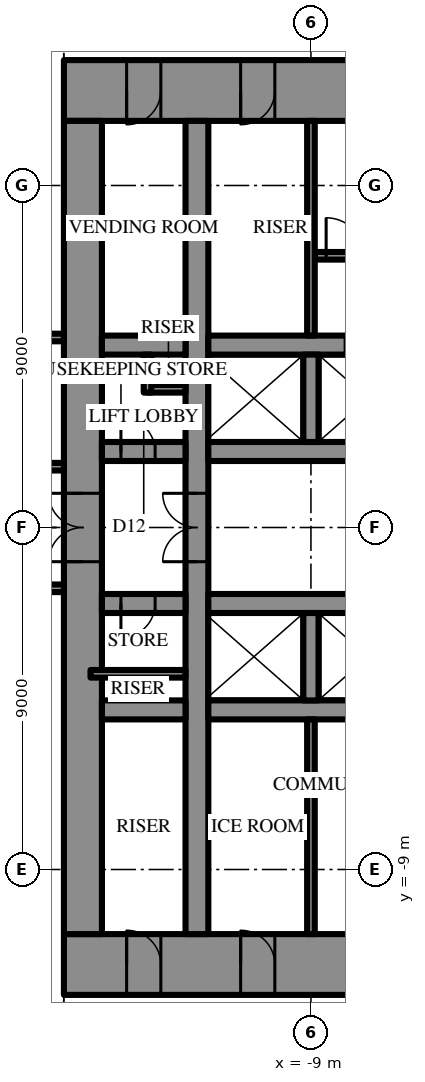
"""IFC4 building model, lengths in metres.
Left out: names, types, materials, properties, quantities, classifications, styles, units other than length and angle.
Written with IfcOpenShell. Run it as: python <this file> out.ifc"""

import sys

from ifc_helpers import new_model, si_unit, direction, frame, frame_2d, origin, place, context, subcontext, project, spatial, rectangle, extrude, element, fill, save


model = new_model("IFC4")
c1 = context("Model", 3, precision=1e-05, world=origin(), true_north=direction((0.0, 1.0)))
c2 = subcontext(c1, "Body", "Model", "MODEL_VIEW")
j1 = project(units=[si_unit("LENGTHUNIT", "METRE"), si_unit("PLANEANGLEUNIT", "RADIAN")], contexts=[c1])
p1 = place(None, origin())
s1 = spatial("IfcSite", under=j1, at=p1, CompositionType="ELEMENT")
p2 = place(p1, origin())
s2 = spatial("IfcBuilding", under=s1, at=p2, CompositionType="ELEMENT")
p3 = place(p2, frame((0.0, 0.0, 278.5)))
s3 = spatial("IfcBuildingStorey", under=s2, at=p3, CompositionType="ELEMENT", Elevation=278.5)
p4 = place(p3, frame((-15.5, 11.5, 0.0), z_axis=(0.0, 0.0, 1.0), x_axis=(1.0, 0.0, 0.0)))
e1 = element("IfcWall", 1, at=p4, inside=s3, PredefinedType="SHEAR", context=c2, shape_type="SweptSolid", body=[
    extrude(rectangle(XDim=31.0, YDim=1.6, at=frame_2d((15.5, 0.0))), origin(), (0.0, 0.0, 1.0), 4.2),
])
p5 = place(p4, frame((16.35, 0.0, 0.0)))
e2 = element("IfcOpeningElement", 2, at=p5, cuts=e1, PredefinedType="OPENING", context=c2, shape_type="SweptSolid", body=[
    extrude(rectangle(XDim=0.9, YDim=2.2, at=frame_2d((0.45, 1.1))), frame((0.0, 0.81, 0.0), z_axis=(0.0, -1.0, 0.0), x_axis=(1.0, 0.0, 0.0)), (0.0, 0.0, 1.0), 1.62),
])
p6 = place(p4, frame((19.35, 0.0, 0.0)))
e3 = element("IfcOpeningElement", 3, at=p6, cuts=e1, PredefinedType="OPENING", context=c2, shape_type="SweptSolid", body=[
    extrude(rectangle(XDim=0.9, YDim=2.2, at=frame_2d((0.45, 1.1))), frame((0.0, 0.81, 0.0), z_axis=(0.0, -1.0, 0.0), x_axis=(1.0, 0.0, 0.0)), (0.0, 0.0, 1.0), 1.62),
])
p7 = place(p4, frame((22.4, 0.0, 0.0)))
e4 = element("IfcOpeningElement", 4, at=p7, cuts=e1, PredefinedType="OPENING", context=c2, shape_type="SweptSolid", body=[
    extrude(rectangle(XDim=1.0, YDim=2.2, at=frame_2d((0.5, 1.1))), frame((0.0, 0.81, 0.0), z_axis=(0.0, -1.0, 0.0), x_axis=(1.0, 0.0, 0.0)), (0.0, 0.0, 1.0), 1.62),
])
p8 = place(p4, frame((1.65, 0.0, 0.0)))
e5 = element("IfcOpeningElement", 5, at=p8, cuts=e1, PredefinedType="OPENING", context=c2, shape_type="SweptSolid", body=[
    extrude(rectangle(XDim=0.9, YDim=2.2, at=frame_2d((0.45, 1.1))), frame((0.0, 0.81, 0.0), z_axis=(0.0, -1.0, 0.0), x_axis=(1.0, 0.0, 0.0)), (0.0, 0.0, 1.0), 1.62),
])
p9 = place(p4, frame((4.65, 0.0, 0.0)))
e6 = element("IfcOpeningElement", 6, at=p9, cuts=e1, PredefinedType="OPENING", context=c2, shape_type="SweptSolid", body=[
    extrude(rectangle(XDim=0.9, YDim=2.2, at=frame_2d((0.45, 1.1))), frame((0.0, 0.81, 0.0), z_axis=(0.0, -1.0, 0.0), x_axis=(1.0, 0.0, 0.0)), (0.0, 0.0, 1.0), 1.62),
])
p10 = place(p4, frame((25.45, 0.0, 0.0)))
e7 = element("IfcOpeningElement", 7, at=p10, cuts=e1, PredefinedType="OPENING", context=c2, shape_type="SweptSolid", body=[
    extrude(rectangle(XDim=0.9, YDim=2.2, at=frame_2d((0.45, 1.1))), frame((0.0, 0.81, 0.0), z_axis=(0.0, -1.0, 0.0), x_axis=(1.0, 0.0, 0.0)), (0.0, 0.0, 1.0), 1.62),
])
p11 = place(p4, frame((28.45, 0.0, 0.0)))
e8 = element("IfcOpeningElement", 8, at=p11, cuts=e1, PredefinedType="OPENING", context=c2, shape_type="SweptSolid", body=[
    extrude(rectangle(XDim=0.9, YDim=2.2, at=frame_2d((0.45, 1.1))), frame((0.0, 0.81, 0.0), z_axis=(0.0, -1.0, 0.0), x_axis=(1.0, 0.0, 0.0)), (0.0, 0.0, 1.0), 1.62),
])
p12 = place(p3, frame((15.5, -11.5, 0.0), z_axis=(0.0, 0.0, 1.0), x_axis=(-1.0, 0.0, 0.0)))
e9 = element("IfcWall", 9, at=p12, inside=s3, PredefinedType="SHEAR", context=c2, shape_type="SweptSolid", body=[
    extrude(rectangle(XDim=31.0, YDim=1.6, at=frame_2d((15.5, 0.0))), origin(), (0.0, 0.0, 1.0), 4.2),
])
p13 = place(p12, frame((16.35, 0.0, 0.0)))
e10 = element("IfcOpeningElement", 10, at=p13, cuts=e9, PredefinedType="OPENING", context=c2, shape_type="SweptSolid", body=[
    extrude(rectangle(XDim=0.9, YDim=2.2, at=frame_2d((0.45, 1.1))), frame((0.0, 0.81, 0.0), z_axis=(0.0, -1.0, 0.0), x_axis=(1.0, 0.0, 0.0)), (0.0, 0.0, 1.0), 1.62),
])
p14 = place(p12, frame((19.35, 0.0, 0.0)))
e11 = element("IfcOpeningElement", 11, at=p14, cuts=e9, PredefinedType="OPENING", context=c2, shape_type="SweptSolid", body=[
    extrude(rectangle(XDim=0.9, YDim=2.2, at=frame_2d((0.45, 1.1))), frame((0.0, 0.81, 0.0), z_axis=(0.0, -1.0, 0.0), x_axis=(1.0, 0.0, 0.0)), (0.0, 0.0, 1.0), 1.62),
])
p15 = place(p12, frame((22.4, 0.0, 0.0)))
e12 = element("IfcOpeningElement", 12, at=p15, cuts=e9, PredefinedType="OPENING", context=c2, shape_type="SweptSolid", body=[
    extrude(rectangle(XDim=1.0, YDim=2.2, at=frame_2d((0.5, 1.1))), frame((0.0, 0.81, 0.0), z_axis=(0.0, -1.0, 0.0), x_axis=(1.0, 0.0, 0.0)), (0.0, 0.0, 1.0), 1.62),
])
p16 = place(p12, frame((1.65, 0.0, 0.0)))
e13 = element("IfcOpeningElement", 13, at=p16, cuts=e9, PredefinedType="OPENING", context=c2, shape_type="SweptSolid", body=[
    extrude(rectangle(XDim=0.9, YDim=2.2, at=frame_2d((0.45, 1.1))), frame((0.0, 0.81, 0.0), z_axis=(0.0, -1.0, 0.0), x_axis=(1.0, 0.0, 0.0)), (0.0, 0.0, 1.0), 1.62),
])
p17 = place(p12, frame((4.65, 0.0, 0.0)))
e14 = element("IfcOpeningElement", 14, at=p17, cuts=e9, PredefinedType="OPENING", context=c2, shape_type="SweptSolid", body=[
    extrude(rectangle(XDim=0.9, YDim=2.2, at=frame_2d((0.45, 1.1))), frame((0.0, 0.81, 0.0), z_axis=(0.0, -1.0, 0.0), x_axis=(1.0, 0.0, 0.0)), (0.0, 0.0, 1.0), 1.62),
])
p18 = place(p12, frame((25.45, 0.0, 0.0)))
e15 = element("IfcOpeningElement", 15, at=p18, cuts=e9, PredefinedType="OPENING", context=c2, shape_type="SweptSolid", body=[
    extrude(rectangle(XDim=0.9, YDim=2.2, at=frame_2d((0.45, 1.1))), frame((0.0, 0.81, 0.0), z_axis=(0.0, -1.0, 0.0), x_axis=(1.0, 0.0, 0.0)), (0.0, 0.0, 1.0), 1.62),
])
p19 = place(p12, frame((28.45, 0.0, 0.0)))
e16 = element("IfcOpeningElement", 16, at=p19, cuts=e9, PredefinedType="OPENING", context=c2, shape_type="SweptSolid", body=[
    extrude(rectangle(XDim=0.9, YDim=2.2, at=frame_2d((0.45, 1.1))), frame((0.0, 0.81, 0.0), z_axis=(0.0, -1.0, 0.0), x_axis=(1.0, 0.0, 0.0)), (0.0, 0.0, 1.0), 1.62),
])
p20 = place(p3, frame((-15.0, 10.7, 0.0), z_axis=(0.0, 0.0, 1.0), x_axis=(0.0, -1.0, 0.0)))
e17 = element("IfcWall", 17, at=p20, inside=s3, PredefinedType="SHEAR", context=c2, shape_type="SweptSolid", body=[
    extrude(rectangle(XDim=21.4, YDim=1.0, at=frame_2d((10.7, 0.0))), origin(), (0.0, 0.0, 1.0), 4.2),
])
p21 = place(p20, frame((9.8, 0.0, 0.0)))
e18 = element("IfcOpeningElement", 18, at=p21, cuts=e17, PredefinedType="OPENING", context=c2, shape_type="SweptSolid", body=[
    extrude(rectangle(XDim=1.8, YDim=2.4, at=frame_2d((0.9, 1.2))), frame((0.0, 0.51, 0.0), z_axis=(0.0, -1.0, 0.0), x_axis=(1.0, 0.0, 0.0)), (0.0, 0.0, 1.0), 1.02),
])
p22 = place(p3, frame((-12.0, -10.7, 0.0), z_axis=(0.0, 0.0, 1.0), x_axis=(0.0, 1.0, 0.0)))
e19 = element("IfcWall", 19, at=p22, inside=s3, PredefinedType="SHEAR", context=c2, shape_type="SweptSolid", body=[
    extrude(rectangle(XDim=21.4, YDim=0.6, at=frame_2d((10.7, 0.0))), origin(), (0.0, 0.0, 1.0), 4.2),
])
p23 = place(p22, frame((9.8, 0.0, 0.0)))
e20 = element("IfcOpeningElement", 20, at=p23, cuts=e19, PredefinedType="OPENING", context=c2, shape_type="SweptSolid", body=[
    extrude(rectangle(XDim=1.8, YDim=2.4, at=frame_2d((0.9, 1.2))), frame((0.0, 0.31, 0.0), z_axis=(0.0, -1.0, 0.0), x_axis=(1.0, 0.0, 0.0)), (0.0, 0.0, 1.0), 0.62),
])
p24 = place(p3, frame((-14.5, 2.0, 0.0), z_axis=(0.0, 0.0, 1.0), x_axis=(1.0, 0.0, 0.0)))
e21 = element("IfcWall", 21, at=p24, inside=s3, PredefinedType="SHEAR", context=c2, shape_type="SweptSolid", body=[
    extrude(rectangle(XDim=2.2, YDim=0.5, at=frame_2d((1.1, 0.0))), origin(), (0.0, 0.0, 1.0), 4.2),
])
p25 = place(p24, frame((0.5, 0.0, 0.0)))
e22 = element("IfcOpeningElement", 22, at=p25, cuts=e21, PredefinedType="OPENING", context=c2, shape_type="SweptSolid", body=[
    extrude(rectangle(XDim=0.9, YDim=2.2, at=frame_2d((0.45, 1.1))), frame((0.0, 0.26, 0.0), z_axis=(0.0, -1.0, 0.0), x_axis=(1.0, 0.0, 0.0)), (0.0, 0.0, 1.0), 0.52),
])
p26 = place(p3, frame((-11.7, 2.0, 0.0), z_axis=(0.0, 0.0, 1.0), x_axis=(1.0, 0.0, 0.0)))
e23 = element("IfcWall", 23, at=p26, inside=s3, PredefinedType="SHEAR", context=c2, shape_type="SweptSolid", body=[
    extrude(rectangle(XDim=5.9, YDim=0.5, at=frame_2d((2.95, 0.0))), origin(), (0.0, 0.0, 1.0), 4.2),
])
p27 = place(p3, frame((-14.5, 4.8, 0.0), z_axis=(0.0, 0.0, 1.0), x_axis=(1.0, 0.0, 0.0)))
e24 = element("IfcWall", 24, at=p27, inside=s3, PredefinedType="SHEAR", context=c2, shape_type="SweptSolid", body=[
    extrude(rectangle(XDim=2.2, YDim=0.5, at=frame_2d((1.1, 0.0))), origin(), (0.0, 0.0, 1.0), 4.2),
])
p28 = place(p3, frame((-11.7, 4.8, 0.0), z_axis=(0.0, 0.0, 1.0), x_axis=(1.0, 0.0, 0.0)))
e25 = element("IfcWall", 25, at=p28, inside=s3, PredefinedType="SHEAR", context=c2, shape_type="SweptSolid", body=[
    extrude(rectangle(XDim=23.4, YDim=0.5, at=frame_2d((11.7, 0.0))), origin(), (0.0, 0.0, 1.0), 4.2),
])
p29 = place(p28, frame((6.6, 0.0, 0.0)))
e26 = element("IfcOpeningElement", 26, at=p29, cuts=e25, PredefinedType="OPENING", context=c2, shape_type="SweptSolid", body=[
    extrude(rectangle(XDim=1.2, YDim=2.2, at=frame_2d((0.6, 1.1))), frame((0.0, 0.26, 0.0), z_axis=(0.0, -1.0, 0.0), x_axis=(1.0, 0.0, 0.0)), (0.0, 0.0, 1.0), 0.52),
])
p30 = place(p28, frame((3.6, 0.0, 0.0)))
e27 = element("IfcOpeningElement", 27, at=p30, cuts=e25, PredefinedType="OPENING", context=c2, shape_type="SweptSolid", body=[
    extrude(rectangle(XDim=1.2, YDim=2.2, at=frame_2d((0.6, 1.1))), frame((0.0, 0.26, 0.0), z_axis=(0.0, -1.0, 0.0), x_axis=(1.0, 0.0, 0.0)), (0.0, 0.0, 1.0), 0.52),
])
p31 = place(p3, frame((-9.0, 2.25, 0.0), z_axis=(0.0, 0.0, 1.0), x_axis=(0.0, 1.0, 0.0)))
e28 = element("IfcWall", 28, at=p31, inside=s3, PredefinedType="SHEAR", context=c2, shape_type="SweptSolid", body=[
    extrude(rectangle(XDim=2.3, YDim=0.4, at=frame_2d((1.15, 0.0))), origin(), (0.0, 0.0, 1.0), 4.2),
])
p32 = place(p3, frame((-8.9, 7.15, 0.0), z_axis=(0.0, 0.0, 1.0), x_axis=(1.0, 0.0, 0.0)))
e29 = element("IfcWall", 29, at=p32, inside=s3, PredefinedType="SHEAR", context=c2, shape_type="SweptSolid", body=[
    extrude(rectangle(XDim=8.6, YDim=0.2, at=frame_2d((4.3, 0.0))), origin(), (0.0, 0.0, 1.0), 4.2),
])
p33 = place(p32, frame((0.3, 0.0, 0.0)))
e30 = element("IfcOpeningElement", 30, at=p33, cuts=e29, PredefinedType="OPENING", context=c2, shape_type="SweptSolid", body=[
    extrude(rectangle(XDim=1.0, YDim=2.2, at=frame_2d((0.5, 1.1))), frame((0.0, 0.11, 0.0), z_axis=(0.0, -1.0, 0.0), x_axis=(1.0, 0.0, 0.0)), (0.0, 0.0, 1.0), 0.22),
])
p34 = place(p3, frame((3.2, -2.0, 0.0), z_axis=(0.0, 0.0, 1.0), x_axis=(-1.0, 0.0, 0.0)))
e31 = element("IfcWall", 31, at=p34, inside=s3, PredefinedType="SHEAR", context=c2, shape_type="SweptSolid", body=[
    extrude(rectangle(XDim=14.9, YDim=0.5, at=frame_2d((7.45, 0.0))), origin(), (0.0, 0.0, 1.0), 4.2),
])
p35 = place(p34, frame((1.15, 0.0, 0.0)))
e32 = element("IfcOpeningElement", 32, at=p35, cuts=e31, PredefinedType="OPENING", context=c2, shape_type="SweptSolid", body=[
    extrude(rectangle(XDim=1.1, YDim=2.2, at=frame_2d((0.55, 1.1))), frame((0.0, 0.26, 0.0), z_axis=(0.0, -1.0, 0.0), x_axis=(1.0, 0.0, 0.0)), (0.0, 0.0, 1.0), 0.52),
])
p36 = place(p34, frame((4.15, 0.0, 0.0)))
e33 = element("IfcOpeningElement", 33, at=p36, cuts=e31, PredefinedType="OPENING", context=c2, shape_type="SweptSolid", body=[
    extrude(rectangle(XDim=1.1, YDim=2.2, at=frame_2d((0.55, 1.1))), frame((0.0, 0.26, 0.0), z_axis=(0.0, -1.0, 0.0), x_axis=(1.0, 0.0, 0.0)), (0.0, 0.0, 1.0), 0.52),
])
p37 = place(p34, frame((7.15, 0.0, 0.0)))
e34 = element("IfcOpeningElement", 34, at=p37, cuts=e31, PredefinedType="OPENING", context=c2, shape_type="SweptSolid", body=[
    extrude(rectangle(XDim=1.1, YDim=2.2, at=frame_2d((0.55, 1.1))), frame((0.0, 0.26, 0.0), z_axis=(0.0, -1.0, 0.0), x_axis=(1.0, 0.0, 0.0)), (0.0, 0.0, 1.0), 0.52),
])
p38 = place(p34, frame((10.15, 0.0, 0.0)))
e35 = element("IfcOpeningElement", 35, at=p38, cuts=e31, PredefinedType="OPENING", context=c2, shape_type="SweptSolid", body=[
    extrude(rectangle(XDim=1.1, YDim=2.2, at=frame_2d((0.55, 1.1))), frame((0.0, 0.26, 0.0), z_axis=(0.0, -1.0, 0.0), x_axis=(1.0, 0.0, 0.0)), (0.0, 0.0, 1.0), 0.52),
])
p39 = place(p3, frame((-12.3, -2.0, 0.0), z_axis=(0.0, 0.0, 1.0), x_axis=(-1.0, 0.0, 0.0)))
e36 = element("IfcWall", 36, at=p39, inside=s3, PredefinedType="SHEAR", context=c2, shape_type="SweptSolid", body=[
    extrude(rectangle(XDim=2.2, YDim=0.5, at=frame_2d((1.1, 0.0))), origin(), (0.0, 0.0, 1.0), 4.2),
])
p40 = place(p39, frame((0.8, 0.0, 0.0)))
e37 = element("IfcOpeningElement", 37, at=p40, cuts=e36, PredefinedType="OPENING", context=c2, shape_type="SweptSolid", body=[
    extrude(rectangle(XDim=0.9, YDim=2.2, at=frame_2d((0.45, 1.1))), frame((0.0, 0.26, 0.0), z_axis=(0.0, -1.0, 0.0), x_axis=(1.0, 0.0, 0.0)), (0.0, 0.0, 1.0), 0.52),
])
p41 = place(p3, frame((11.7, -4.8, 0.0), z_axis=(0.0, 0.0, 1.0), x_axis=(-1.0, 0.0, 0.0)))
e38 = element("IfcWall", 38, at=p41, inside=s3, PredefinedType="SHEAR", context=c2, shape_type="SweptSolid", body=[
    extrude(rectangle(XDim=23.4, YDim=0.5, at=frame_2d((11.7, 0.0))), origin(), (0.0, 0.0, 1.0), 4.2),
])
p42 = place(p41, frame((6.6, 0.0, 0.0)))
e39 = element("IfcOpeningElement", 39, at=p42, cuts=e38, PredefinedType="OPENING", context=c2, shape_type="SweptSolid", body=[
    extrude(rectangle(XDim=1.2, YDim=2.2, at=frame_2d((0.6, 1.1))), frame((0.0, 0.26, 0.0), z_axis=(0.0, -1.0, 0.0), x_axis=(1.0, 0.0, 0.0)), (0.0, 0.0, 1.0), 0.52),
])
p43 = place(p41, frame((3.6, 0.0, 0.0)))
e40 = element("IfcOpeningElement", 40, at=p43, cuts=e38, PredefinedType="OPENING", context=c2, shape_type="SweptSolid", body=[
    extrude(rectangle(XDim=1.2, YDim=2.2, at=frame_2d((0.6, 1.1))), frame((0.0, 0.26, 0.0), z_axis=(0.0, -1.0, 0.0), x_axis=(1.0, 0.0, 0.0)), (0.0, 0.0, 1.0), 0.52),
])
p44 = place(p3, frame((-12.3, -4.8, 0.0), z_axis=(0.0, 0.0, 1.0), x_axis=(-1.0, 0.0, 0.0)))
e41 = element("IfcWall", 41, at=p44, inside=s3, PredefinedType="SHEAR", context=c2, shape_type="SweptSolid", body=[
    extrude(rectangle(XDim=2.2, YDim=0.5, at=frame_2d((1.1, 0.0))), origin(), (0.0, 0.0, 1.0), 4.2),
])
p45 = place(p3, frame((-9.0, -2.25, 0.0), z_axis=(0.0, 0.0, 1.0), x_axis=(0.0, -1.0, 0.0)))
e42 = element("IfcWall", 42, at=p45, inside=s3, PredefinedType="SHEAR", context=c2, shape_type="SweptSolid", body=[
    extrude(rectangle(XDim=2.3, YDim=0.4, at=frame_2d((1.15, 0.0))), origin(), (0.0, 0.0, 1.0), 4.2),
])
for number, where, z_axis, x_axis in (
    (43, (-9.0, 5.05, 0.0), (0.0, 0.0, 1.0), (0.0, 1.0, 0.0)),
    (44, (-9.0, -5.05, 0.0), (0.0, 0.0, 1.0), (0.0, -1.0, 0.0)),
):
    element("IfcWall", number, at=place(p3, frame(where, z_axis=z_axis, x_axis=x_axis)), inside=s3, PredefinedType="PARTITIONING", context=c2, shape_type="SweptSolid", body=[
        extrude(rectangle(XDim=5.65, YDim=0.2, at=frame_2d((2.825, 0.0))), origin(), (0.0, 0.0, 1.0), 4.0),
    ])
for number, where, z_axis, x_axis in (
    (45, (-13.3, 3.65, 0.0), (0.0, 0.0, 1.0), (1.0, 0.0, 0.0)),
    (46, (-13.3, 3.55, 0.0), (0.0, 0.0, 1.0), (0.0, 1.0, 0.0)),
):
    element("IfcWall", number, at=place(p3, frame(where, z_axis=z_axis, x_axis=x_axis)), inside=s3, PredefinedType="PARTITIONING", context=c2, shape_type="SweptSolid", body=[
        extrude(rectangle(XDim=1.0, YDim=0.2, at=frame_2d((0.5, 0.0))), origin(), (0.0, 0.0, 1.0), 4.0),
    ])
p46 = place(p3, frame((-12.3, -3.85, 0.0), z_axis=(0.0, 0.0, 1.0), x_axis=(-1.0, 0.0, 0.0)))
e47 = element("IfcWall", 47, at=p46, inside=s3, PredefinedType="PARTITIONING", context=c2, shape_type="SweptSolid", body=[
    extrude(rectangle(XDim=2.5, YDim=0.2, at=frame_2d((1.25, 0.0))), origin(), (0.0, 0.0, 1.0), 4.0),
])
p47 = place(p3, frame((-15.5, 1.6, 0.0), z_axis=(0.0, 0.0, 1.0), x_axis=(-1.0, 0.0, 0.0)))
e48 = element("IfcWall", 48, at=p47, inside=s3, PredefinedType="PARTITIONING", context=c2, shape_type="SweptSolid", body=[
    extrude(rectangle(XDim=12.2, YDim=0.2, at=frame_2d((6.1, 0.0))), origin(), (0.0, 0.0, 1.0), 4.0),
])
p48 = place(p47, frame((8.04, 0.0, 0.0)))
e49 = element("IfcOpeningElement", 49, at=p48, cuts=e48, PredefinedType="OPENING", context=c2, shape_type="SweptSolid", body=[
    extrude(rectangle(XDim=1.0, YDim=2.2, at=frame_2d((0.5, 1.1))), frame((0.0, 0.11, 0.0), z_axis=(0.0, -1.0, 0.0), x_axis=(1.0, 0.0, 0.0)), (0.0, 0.0, 1.0), 0.22),
])
p49 = place(p3, frame((-15.5, -1.6, 0.0), z_axis=(0.0, 0.0, 1.0), x_axis=(-1.0, 0.0, 0.0)))
e50 = element("IfcWall", 50, at=p49, inside=s3, PredefinedType="PARTITIONING", context=c2, shape_type="SweptSolid", body=[
    extrude(rectangle(XDim=12.2, YDim=0.2, at=frame_2d((6.1, 0.0))), origin(), (0.0, 0.0, 1.0), 4.0),
])
p50 = place(p49, frame((8.04, 0.0, 0.0)))
e51 = element("IfcOpeningElement", 51, at=p50, cuts=e50, PredefinedType="OPENING", context=c2, shape_type="SweptSolid", body=[
    extrude(rectangle(XDim=1.0, YDim=2.2, at=frame_2d((0.5, 1.1))), frame((0.0, 0.11, 0.0), z_axis=(0.0, -1.0, 0.0), x_axis=(1.0, 0.0, 0.0)), (0.0, 0.0, 1.0), 0.22),
])
p51 = place(p3, frame((-15.5, 5.0, 0.0), z_axis=(0.0, 0.0, 1.0), x_axis=(-1.0, 0.0, 0.0)))
e52 = element("IfcWall", 52, at=p51, inside=s3, PredefinedType="PARTITIONING", context=c2, shape_type="SweptSolid", body=[
    extrude(rectangle(XDim=14.845, YDim=0.2, at=frame_2d((7.423, 0.0))), origin(), (0.0, 0.0, 1.0), 4.0),
])
p52 = place(p51, frame((0.985, 0.0, 0.0)))
e53 = element("IfcOpeningElement", 53, at=p52, cuts=e52, PredefinedType="OPENING", context=c2, shape_type="SweptSolid", body=[
    extrude(rectangle(XDim=1.0, YDim=2.2, at=frame_2d((0.5, 1.1))), frame((0.0, 0.11, 0.0), z_axis=(0.0, -1.0, 0.0), x_axis=(1.0, 0.0, 0.0)), (0.0, 0.0, 1.0), 0.22),
])
p53 = place(p21, frame((1.8, 0.0, 0.0), z_axis=(0.0, 0.0, 1.0), x_axis=(-1.0, 0.0, 0.0)))
e54 = element("IfcDoor", 54, at=p53, inside=s3, OperationType="DOUBLE_DOOR_SINGLE_SWING", PredefinedType="DOOR", context=c2, shape_type="SweptSolid", body=[
    extrude(rectangle(XDim=1.8, YDim=2.4, at=frame_2d((0.9, 1.2))), frame((0.0, 0.025, 0.0), z_axis=(0.0, -1.0, 0.0), x_axis=(1.0, 0.0, 0.0)), (0.0, 0.0, 1.0), 0.05),
])
fill(e18, e54)
p54 = place(p33, origin())
e55 = element("IfcDoor", 55, at=p54, inside=s3, OperationType="SINGLE_SWING_RIGHT", PredefinedType="DOOR", context=c2, shape_type="SweptSolid", body=[
    extrude(rectangle(XDim=1.0, YDim=2.2, at=frame_2d((0.5, 1.1))), frame((0.0, 0.025, 0.0), z_axis=(0.0, -1.0, 0.0), x_axis=(1.0, 0.0, 0.0)), (0.0, 0.0, 1.0), 0.05),
])
fill(e30, e55)
p55 = place(p8, frame((0.9, 0.0, 0.0), z_axis=(0.0, 0.0, 1.0), x_axis=(-1.0, 0.0, 0.0)))
e56 = element("IfcDoor", 56, at=p55, inside=s3, OperationType="SINGLE_SWING_LEFT", PredefinedType="DOOR", context=c2, shape_type="SweptSolid", body=[
    extrude(rectangle(XDim=0.9, YDim=2.2, at=frame_2d((0.45, 1.1))), frame((0.0, 0.025, 0.0), z_axis=(0.0, -1.0, 0.0), x_axis=(1.0, 0.0, 0.0)), (0.0, 0.0, 1.0), 0.05),
])
fill(e5, e56)
p56 = place(p9, frame((0.9, 0.0, 0.0), z_axis=(0.0, 0.0, 1.0), x_axis=(-1.0, 0.0, 0.0)))
e57 = element("IfcDoor", 57, at=p56, inside=s3, OperationType="SINGLE_SWING_LEFT", PredefinedType="DOOR", context=c2, shape_type="SweptSolid", body=[
    extrude(rectangle(XDim=0.9, YDim=2.2, at=frame_2d((0.45, 1.1))), frame((0.0, 0.025, 0.0), z_axis=(0.0, -1.0, 0.0), x_axis=(1.0, 0.0, 0.0)), (0.0, 0.0, 1.0), 0.05),
])
fill(e6, e57)
p57 = place(p18, frame((0.9, 0.0, 0.0), z_axis=(0.0, 0.0, 1.0), x_axis=(-1.0, 0.0, 0.0)))
e58 = element("IfcDoor", 58, at=p57, inside=s3, OperationType="SINGLE_SWING_RIGHT", PredefinedType="DOOR", context=c2, shape_type="SweptSolid", body=[
    extrude(rectangle(XDim=0.9, YDim=2.2, at=frame_2d((0.45, 1.1))), frame((0.0, 0.025, 0.0), z_axis=(0.0, -1.0, 0.0), x_axis=(1.0, 0.0, 0.0)), (0.0, 0.0, 1.0), 0.05),
])
fill(e15, e58)
p58 = place(p19, frame((0.9, 0.0, 0.0), z_axis=(0.0, 0.0, 1.0), x_axis=(-1.0, 0.0, 0.0)))
e59 = element("IfcDoor", 59, at=p58, inside=s3, OperationType="SINGLE_SWING_RIGHT", PredefinedType="DOOR", context=c2, shape_type="SweptSolid", body=[
    extrude(rectangle(XDim=0.9, YDim=2.2, at=frame_2d((0.45, 1.1))), frame((0.0, 0.025, 0.0), z_axis=(0.0, -1.0, 0.0), x_axis=(1.0, 0.0, 0.0)), (0.0, 0.0, 1.0), 0.05),
])
fill(e16, e59)
p59 = place(p25, origin())
e60 = element("IfcDoor", 60, at=p59, inside=s3, OperationType="SINGLE_SWING_RIGHT", PredefinedType="DOOR", context=c2, shape_type="SweptSolid", body=[
    extrude(rectangle(XDim=0.9, YDim=2.2, at=frame_2d((0.45, 1.1))), frame((0.0, 0.025, 0.0), z_axis=(0.0, -1.0, 0.0), x_axis=(1.0, 0.0, 0.0)), (0.0, 0.0, 1.0), 0.05),
])
fill(e22, e60)
p60 = place(p40, origin())
e61 = element("IfcDoor", 61, at=p60, inside=s3, OperationType="SINGLE_SWING_LEFT", PredefinedType="DOOR", context=c2, shape_type="SweptSolid", body=[
    extrude(rectangle(XDim=0.9, YDim=2.2, at=frame_2d((0.45, 1.1))), frame((0.0, 0.025, 0.0), z_axis=(0.0, -1.0, 0.0), x_axis=(1.0, 0.0, 0.0)), (0.0, 0.0, 1.0), 0.05),
])
fill(e37, e61)
p61 = place(p23, origin())
e62 = element("IfcDoor", 62, at=p61, inside=s3, OperationType="DOUBLE_DOOR_SINGLE_SWING", PredefinedType="DOOR", context=c2, shape_type="SweptSolid", body=[
    extrude(rectangle(XDim=1.8, YDim=2.4, at=frame_2d((0.9, 1.2))), frame((0.0, 0.025, 0.0), z_axis=(0.0, -1.0, 0.0), x_axis=(1.0, 0.0, 0.0)), (0.0, 0.0, 1.0), 0.05),
])
fill(e20, e62)
save(model, sys.argv[1])
